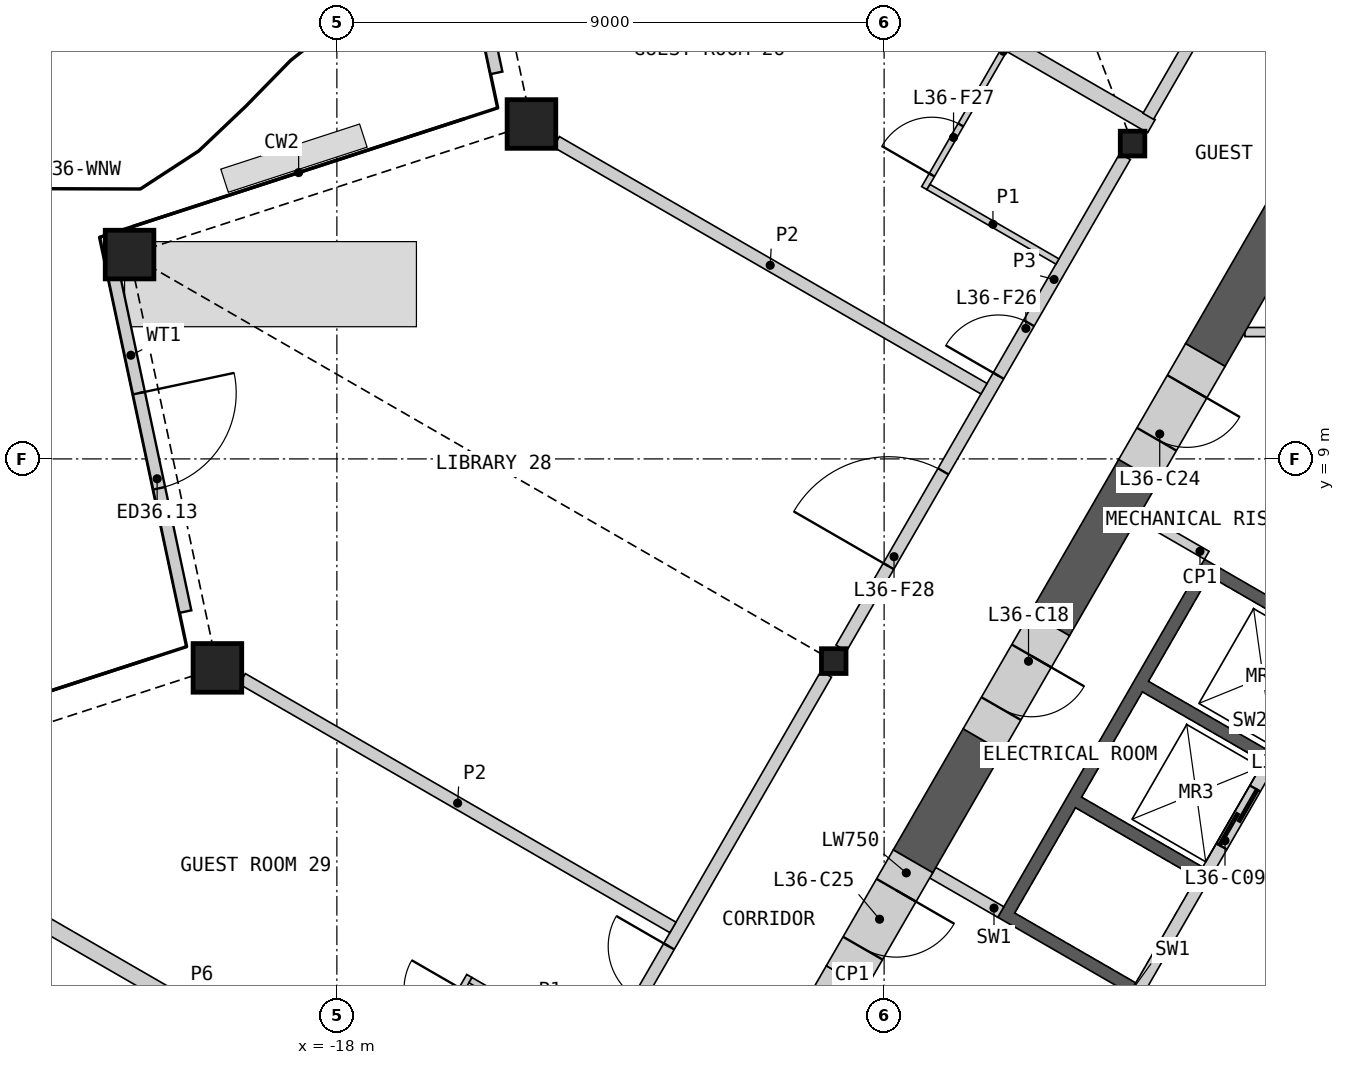
"""IFC4 building model, lengths in metres.
Left out: names, types, materials, properties, quantities, classifications, styles, units other than length and angle.
Written with IfcOpenShell. Run it as: python <this file> out.ifc"""

import sys

from ifc_helpers import new_model, si_unit, direction, frame, frame_2d, origin, origin_2d, place, context, subcontext, project, spatial, polyline, rectangle, hollow_rectangle, i_section, outline, extrude, element, fill, save


model = new_model("IFC4")
c1 = context("Model", 3, precision=1e-05, world=origin(), true_north=direction((0.0, 1.0)))
c2 = subcontext(c1, "Body", "Model", "MODEL_VIEW")
j1 = project(units=[si_unit("LENGTHUNIT", "METRE"), si_unit("PLANEANGLEUNIT", "RADIAN")], contexts=[c1])
p1 = place(None, origin())
s1 = spatial("IfcSite", under=j1, at=p1, CompositionType="ELEMENT")
p2 = place(p1, origin())
s2 = spatial("IfcBuilding", under=s1, at=p2, CompositionType="ELEMENT")
p3 = place(p2, frame((0.0, 0.0, 172.8)))
s3 = spatial("IfcBuildingStorey", under=s2, at=p3, CompositionType="ELEMENT", Elevation=172.8)
for number, where, z_axis, x_axis in (
    (1, (-14.8, 14.508, 0.0), (0.0, 0.0, 1.0), (1.0, 0.0, 0.0)),
    (2, (-21.409, 12.361, 0.0), (0.0, 0.0, 1.0), (1.0, 0.0, 0.0)),
    (3, (-19.965, 5.563, 0.0), (0.0, 0.0, 1.0), (1.0, 0.0, 0.0)),
):
    element("IfcColumn", number, at=place(p3, frame(where, z_axis=z_axis, x_axis=x_axis)), inside=s3, PredefinedType="COLUMN", context=c2, shape_type="SweptSolid", body=[
        extrude(hollow_rectangle(XDim=0.8, YDim=0.8, WallThickness=0.05, at=origin_2d()), origin(), (0.0, 0.0, 1.0), 3.6),
    ])
for number, where, z_axis, x_axis in (
    (4, (-4.914, 14.186, 0.0), (0.0, 0.0, 1.0), (1.0, 0.0, 0.0)),
    (5, (-9.828, 5.675, 0.0), (0.0, 0.0, 1.0), (1.0, 0.0, 0.0)),
):
    element("IfcColumn", number, at=place(p3, frame(where, z_axis=z_axis, x_axis=x_axis)), inside=s3, PredefinedType="COLUMN", context=c2, shape_type="SweptSolid", body=[
        extrude(i_section(OverallWidth=0.404, OverallDepth=0.407, WebThickness=0.027, FlangeThickness=0.044, at=origin_2d()), origin(), (0.0, 0.0, 1.0), 3.6),
    ])
p4 = place(p3, frame((-16.571, 20.971, 0.0), z_axis=(0.0, 0.0, 1.0), x_axis=(0.207872471739, -0.978155936184, 0.0)))
e6 = element("IfcWall", 6, at=p4, inside=s3, PredefinedType="SOLIDWALL", context=c2, shape_type="SweptSolid", body=[
    extrude(rectangle(XDim=5.748, YDim=0.2, at=frame_2d((2.874, 0.0))), origin(), (0.0, 0.0, 1.0), 2.701),
])
p5 = place(p4, frame((2.074, 0.0, 0.0)))
e7 = element("IfcOpeningElement", 7, at=p5, cuts=e6, PredefinedType="OPENING", context=c2, shape_type="SweptSolid", body=[
    extrude(rectangle(XDim=1.6, YDim=2.4, at=frame_2d((0.8, 1.2))), frame((0.0, 0.11, 0.0), z_axis=(0.0, -1.0, 0.0), x_axis=(1.0, 0.0, 0.0)), (0.0, 0.0, 1.0), 0.22),
])
p6 = place(p3, frame((-21.686, 12.111, 0.0), z_axis=(0.0, 0.0, 1.0), x_axis=(0.207872471739, -0.978155936184, 0.0)))
e8 = element("IfcWall", 8, at=p6, inside=s3, PredefinedType="SOLIDWALL", context=c2, shape_type="SweptSolid", body=[
    extrude(rectangle(XDim=5.748, YDim=0.2, at=frame_2d((2.874, 0.0))), origin(), (0.0, 0.0, 1.0), 2.701),
])
p7 = place(p6, frame((2.074, 0.0, 0.0)))
e9 = element("IfcOpeningElement", 9, at=p7, cuts=e8, PredefinedType="OPENING", context=c2, shape_type="SweptSolid", body=[
    extrude(rectangle(XDim=1.6, YDim=2.4, at=frame_2d((0.8, 1.2))), frame((0.0, 0.11, 0.0), z_axis=(0.0, -1.0, 0.0), x_axis=(1.0, 0.0, 0.0)), (0.0, 0.0, 1.0), 0.22),
])
p8 = place(p3, origin())
e10 = element("IfcWall", 10, at=p8, inside=s3, PredefinedType="SHEAR", context=c2, shape_type="SweptSolid", body=[
    extrude(outline(polyline([(-4.96, 0.208), (-7.131, 1.461), (-3.731, 7.35), (-1.561, 6.097), (-1.66, 5.924), (-3.652, 7.074), (-4.652, 5.342), (-2.66, 4.192), (-2.76, 4.019), (-4.752, 5.169), (-5.752, 3.437), (-3.76, 2.287), (-3.861, 2.113), (-5.852, 3.263), (-6.852, 1.531), (-4.861, 0.381), (-4.96, 0.208)])), origin(), (0.0, 0.0, 1.0), 3.25),
])
p9 = place(p3, frame((-1.631, 5.776, 0.0), z_axis=(0.0, 0.0, 1.0), x_axis=(-0.499992876559, -0.866029516466, 0.0)))
e11 = element("IfcWall", 11, at=p9, inside=s3, PredefinedType="SOLIDWALL", context=c2, shape_type="SweptSolid", body=[
    extrude(rectangle(XDim=6.486, YDim=0.2, at=frame_2d((3.243, 0.0))), origin(), (0.0, 0.0, 1.0), 3.25),
])
p10 = place(p9, frame((0.337, 0.0, 0.0)))
e12 = element("IfcOpeningElement", 12, at=p10, cuts=e11, PredefinedType="OPENING", context=c2, shape_type="SweptSolid", body=[
    extrude(rectangle(XDim=1.1, YDim=2.1, at=frame_2d((0.55, 1.05))), frame((0.0, 0.11, 0.0), z_axis=(0.0, -1.0, 0.0), x_axis=(1.0, 0.0, 0.0)), (0.0, 0.0, 1.0), 0.22),
])
p11 = place(p9, frame((2.537, 0.0, 0.0)))
e13 = element("IfcOpeningElement", 13, at=p11, cuts=e11, PredefinedType="OPENING", context=c2, shape_type="SweptSolid", body=[
    extrude(rectangle(XDim=1.1, YDim=2.1, at=frame_2d((0.55, 1.05))), frame((0.0, 0.11, 0.0), z_axis=(0.0, -1.0, 0.0), x_axis=(1.0, 0.0, 0.0)), (0.0, 0.0, 1.0), 0.22),
])
for number, where, z_axis, x_axis in (
    (14, (-7.081, 1.548, 0.0), (0.0, 0.0, 1.0), (-0.866, 0.5, 0.0)),
    (15, (-8.181, -0.357, 0.0), (0.0, 0.0, 1.0), (-0.866, 0.5, 0.0)),
):
    element("IfcWall", number, at=place(p3, frame(where, z_axis=z_axis, x_axis=x_axis)), inside=s3, PredefinedType="SHEAR", context=c2, shape_type="SweptSolid", body=[
        extrude(rectangle(XDim=1.293, YDim=0.2, at=frame_2d((0.646, 0.0))), origin(), (0.0, 0.0, 1.0), 3.25),
    ])
p12 = place(p3, frame((-3.693, 7.415, 0.0), z_axis=(0.0, 0.0, 1.0), x_axis=(-0.866003189247, 0.500038474733, 0.0)))
e16 = element("IfcWall", 16, at=p12, inside=s3, PredefinedType="PARTITIONING", context=c2, shape_type="SweptSolid", body=[
    extrude(rectangle(XDim=1.293, YDim=0.15, at=frame_2d((0.646, 0.0))), origin(), (0.0, 0.0, 1.0), 3.25),
])
p13 = place(p3, frame((-1.544, 11.087, 0.0), z_axis=(0.0, 0.0, 1.0), x_axis=(-1.0, 0.0, 0.0)))
e17 = element("IfcWall", 17, at=p13, inside=s3, PredefinedType="PARTITIONING", context=c2, shape_type="SweptSolid", body=[
    extrude(rectangle(XDim=1.522, YDim=0.15, at=frame_2d((0.761, 0.0))), origin(), (0.0, 0.0, 1.0), 3.25),
])
p14 = place(p3, frame((-0.325, 16.585, 0.0), z_axis=(0.0, 0.0, 1.0), x_axis=(-0.499993425452, -0.866029199568, 0.0)))
e18 = element("IfcWall", 18, at=p14, inside=s3, PredefinedType="SHEAR", context=c2, shape_type="SweptSolid", body=[
    extrude(rectangle(XDim=6.785, YDim=0.75, at=frame_2d((3.393, 0.0))), origin(), (0.0, 0.0, 1.0), 3.25),
])
p15 = place(p3, frame((-4.817, 8.804, 0.0), z_axis=(0.0, 0.0, 1.0), x_axis=(-0.500029273391, -0.866008502124, 0.0)))
e19 = element("IfcWall", 19, at=p15, inside=s3, PredefinedType="SHEAR", context=c2, shape_type="SweptSolid", body=[
    extrude(rectangle(XDim=2.916, YDim=0.75, at=frame_2d((1.458, 0.0))), origin(), (0.0, 0.0, 1.0), 3.25),
])
p16 = place(p3, frame((-7.375, 4.374, 0.0), z_axis=(0.0, 0.0, 1.0), x_axis=(-0.499952165731, -0.866053019151, 0.0)))
e20 = element("IfcWall", 20, at=p16, inside=s3, PredefinedType="SHEAR", context=c2, shape_type="SweptSolid", body=[
    extrude(rectangle(XDim=2.3, YDim=0.75, at=frame_2d((1.15, 0.0))), origin(), (0.0, 0.0, 1.0), 3.25),
])
p17 = place(p3, frame((-6.275, 6.279, 0.0), z_axis=(0.0, 0.0, 1.0), x_axis=(-0.499946605688, -0.86605622881, 0.0)))
e21 = element("IfcWall", 21, at=p17, inside=s3, PredefinedType="SHEAR", context=c2, shape_type="SweptSolid", body=[
    extrude(rectangle(XDim=2.2, YDim=0.75, at=frame_2d((1.1, 0.0))), origin(), (0.0, 0.0, 1.0), 3.25),
])
p18 = place(p17, frame((0.6, 0.0, 0.0)))
e22 = element("IfcOpeningElement", 22, at=p18, cuts=e21, PredefinedType="OPENING", context=c2, shape_type="SweptSolid", body=[
    extrude(rectangle(XDim=1.0, YDim=2.1, at=frame_2d((0.5, 1.05))), frame((0.0, 0.385, 0.0), z_axis=(0.0, -1.0, 0.0), x_axis=(1.0, 0.0, 0.0)), (0.0, 0.0, 1.0), 0.77),
])
p19 = place(p3, frame((-9.625, 0.477, 0.0), z_axis=(0.0, 0.0, 1.0), x_axis=(-0.499995718215, -0.86602787586, 0.0)))
e23 = element("IfcWall", 23, at=p19, inside=s3, PredefinedType="SHEAR", context=c2, shape_type="SweptSolid", body=[
    extrude(rectangle(XDim=3.016, YDim=0.75, at=frame_2d((1.508, 0.0))), origin(), (0.0, 0.0, 1.0), 3.25),
])
p20 = place(p19, frame((1.4, 0.0, 0.0)))
e24 = element("IfcOpeningElement", 24, at=p20, cuts=e23, PredefinedType="OPENING", context=c2, shape_type="SweptSolid", body=[
    extrude(rectangle(XDim=1.0, YDim=2.1, at=frame_2d((0.5, 1.05))), frame((0.0, 0.385, 0.0), z_axis=(0.0, -1.0, 0.0), x_axis=(1.0, 0.0, 0.0)), (0.0, 0.0, 1.0), 0.77),
])
p21 = place(p3, frame((-3.717, 10.709, 0.0), z_axis=(0.0, 0.0, 1.0), x_axis=(-0.50002983664, -0.866008176907, 0.0)))
e25 = element("IfcWall", 25, at=p21, inside=s3, PredefinedType="SHEAR", context=c2, shape_type="SweptSolid", body=[
    extrude(rectangle(XDim=2.2, YDim=0.75, at=frame_2d((1.1, 0.0))), origin(), (0.0, 0.0, 1.0), 3.25),
])
p22 = place(p21, frame((0.6, 0.0, 0.0)))
e26 = element("IfcOpeningElement", 26, at=p22, cuts=e25, PredefinedType="OPENING", context=c2, shape_type="SweptSolid", body=[
    extrude(rectangle(XDim=1.0, YDim=2.1, at=frame_2d((0.5, 1.05))), frame((0.0, 0.385, 0.0), z_axis=(0.0, -1.0, 0.0), x_axis=(1.0, 0.0, 0.0)), (0.0, 0.0, 1.0), 0.77),
])
p23 = place(p3, frame((-8.525, 2.382, 0.0), z_axis=(0.0, 0.0, 1.0), x_axis=(-0.500077893725, -0.86598042715, 0.0)))
e27 = element("IfcWall", 27, at=p23, inside=s3, PredefinedType="SHEAR", context=c2, shape_type="SweptSolid", body=[
    extrude(rectangle(XDim=2.2, YDim=0.75, at=frame_2d((1.1, 0.0))), origin(), (0.0, 0.0, 1.0), 3.25),
])
p24 = place(p23, frame((0.55, 0.0, 0.0)))
e28 = element("IfcOpeningElement", 28, at=p24, cuts=e27, PredefinedType="OPENING", context=c2, shape_type="SweptSolid", body=[
    extrude(rectangle(XDim=1.1, YDim=2.1, at=frame_2d((0.55, 1.05))), frame((0.0, 0.385, 0.0), z_axis=(0.0, -1.0, 0.0), x_axis=(1.0, 0.0, 0.0)), (0.0, 0.0, 1.0), 0.77),
])
p25 = place(p3, frame((-26.164, 3.292, 0.0), z_axis=(0.0, 0.0, 1.0), x_axis=(0.866022412254, -0.500005181446, 0.0)))
e29 = element("IfcWall", 29, at=p25, inside=s3, PredefinedType="PARTITIONING", context=c2, shape_type="SweptSolid", body=[
    extrude(rectangle(XDim=13.081, YDim=0.25, at=frame_2d((6.541, 0.0))), origin(), (0.0, 0.0, 1.0), 2.404),
])
p26 = place(p3, frame((-15.835, 20.956, 0.0), z_axis=(0.0, 0.0, 1.0), x_axis=(0.866029765546, -0.499992445131, 0.0)))
e30 = element("IfcWall", 30, at=p26, inside=s3, PredefinedType="PARTITIONING", context=c2, shape_type="SweptSolid", body=[
    extrude(rectangle(XDim=12.968, YDim=0.25, at=frame_2d((6.484, 0.0))), origin(), (0.0, 0.0, 1.0), 2.404),
])
p27 = place(p3, frame((-9.705, 5.888, 0.0), z_axis=(0.0, 0.0, 1.0), x_axis=(0.50000393355, 0.866023132736, 0.0)))
e31 = element("IfcWall", 31, at=p27, inside=s3, PredefinedType="PARTITIONING", context=c2, shape_type="SweptSolid", body=[
    extrude(rectangle(XDim=9.335, YDim=0.2, at=frame_2d((4.667, 0.0))), origin(), (0.0, 0.0, 1.0), 3.25),
])
p28 = place(p27, frame((5.172, 0.0, 0.0)))
e32 = element("IfcOpeningElement", 32, at=p28, cuts=e31, PredefinedType="OPENING", context=c2, shape_type="SweptSolid", body=[
    extrude(rectangle(XDim=1.0, YDim=2.1, at=frame_2d((0.5, 1.05))), frame((0.0, 0.11, 0.0), z_axis=(0.0, -1.0, 0.0), x_axis=(1.0, 0.0, 0.0)), (0.0, 0.0, 1.0), 0.22),
])
p29 = place(p27, frame((1.556, 0.0, 0.0)))
e33 = element("IfcOpeningElement", 33, at=p29, cuts=e31, PredefinedType="OPENING", context=c2, shape_type="SweptSolid", body=[
    extrude(rectangle(XDim=1.8, YDim=2.1, at=frame_2d((0.9, 1.05))), frame((0.0, 0.11, 0.0), z_axis=(0.0, -1.0, 0.0), x_axis=(1.0, 0.0, 0.0)), (0.0, 0.0, 1.0), 0.22),
])
p30 = place(p3, frame((-14.619, -2.624, 0.0), z_axis=(0.0, 0.0, 1.0), x_axis=(0.50000393355, 0.866023132736, 0.0)))
e34 = element("IfcWall", 34, at=p30, inside=s3, PredefinedType="PARTITIONING", context=c2, shape_type="SweptSolid", body=[
    extrude(rectangle(XDim=9.335, YDim=0.2, at=frame_2d((4.667, 0.0))), origin(), (0.0, 0.0, 1.0), 3.25),
])
p31 = place(p30, frame((3.163, 0.0, 0.0)))
e35 = element("IfcOpeningElement", 35, at=p31, cuts=e34, PredefinedType="OPENING", context=c2, shape_type="SweptSolid", body=[
    extrude(rectangle(XDim=1.0, YDim=2.1, at=frame_2d((0.5, 1.05))), frame((0.0, 0.11, 0.0), z_axis=(0.0, -1.0, 0.0), x_axis=(1.0, 0.0, 0.0)), (0.0, 0.0, 1.0), 0.22),
])
p32 = place(p3, frame((-4.655, 14.635, 0.0), z_axis=(0.0, 0.0, 1.0), x_axis=(0.499988331988, 0.866032140209, 0.0)))
e36 = element("IfcWall", 36, at=p32, inside=s3, PredefinedType="PARTITIONING", context=c2, shape_type="SweptSolid", body=[
    extrude(rectangle(XDim=5.485, YDim=0.2, at=frame_2d((2.742, 0.0))), origin(), (0.0, 0.0, 1.0), 3.25),
])
p33 = place(p32, frame((4.032, 0.0, 0.0)))
e37 = element("IfcOpeningElement", 37, at=p33, cuts=e36, PredefinedType="OPENING", context=c2, shape_type="SweptSolid", body=[
    extrude(rectangle(XDim=1.1, YDim=2.1, at=frame_2d((0.55, 1.05))), frame((0.0, 0.11, 0.0), z_axis=(0.0, -1.0, 0.0), x_axis=(1.0, 0.0, 0.0)), (0.0, 0.0, 1.0), 0.22),
])
p34 = place(p3, frame((-19.555, 5.383, 0.0), z_axis=(0.0, 0.0, 1.0), x_axis=(0.866027979776, -0.499995538225, 0.0)))
e38 = element("IfcWall", 38, at=p34, inside=s3, PredefinedType="PARTITIONING", context=c2, shape_type="SweptSolid", body=[
    extrude(rectangle(XDim=8.177, YDim=0.2, at=frame_2d((4.089, 0.0))), origin(), (0.0, 0.0, 1.0), 2.404),
])
p35 = place(p3, frame((-14.39, 14.215, 0.0), z_axis=(0.0, 0.0, 1.0), x_axis=(0.86602738064, -0.499996575971, 0.0)))
e39 = element("IfcWall", 39, at=p35, inside=s3, PredefinedType="PARTITIONING", context=c2, shape_type="SweptSolid", body=[
    extrude(rectangle(XDim=8.121, YDim=0.2, at=frame_2d((4.06, 0.0))), origin(), (0.0, 0.0, 1.0), 2.404),
])
p36 = place(p3, frame((-18.421, -4.008, 0.0), z_axis=(0.0, 0.0, 1.0), x_axis=(0.500006934395, 0.866021400173, 0.0)))
e40 = element("IfcWall", 40, at=p36, inside=s3, PredefinedType="PARTITIONING", context=c2, shape_type="SweptSolid", body=[
    extrude(rectangle(XDim=5.2, YDim=0.1, at=frame_2d((2.6, 0.0))), origin(), (0.0, 0.0, 1.0), 2.404),
])
p37 = place(p36, frame((4.0, 0.0, 0.0)))
e41 = element("IfcOpeningElement", 41, at=p37, cuts=e40, PredefinedType="OPENING", context=c2, shape_type="SweptSolid", body=[
    extrude(rectangle(XDim=0.95, YDim=2.1, at=frame_2d((0.475, 1.05))), frame((0.0, 0.06, 0.0), z_axis=(0.0, -1.0, 0.0), x_axis=(1.0, 0.0, 0.0)), (0.0, 0.0, 1.0), 0.12),
])
p38 = place(p36, frame((0.25, 0.0, 0.0)))
e42 = element("IfcOpeningElement", 42, at=p38, cuts=e40, PredefinedType="OPENING", context=c2, shape_type="SweptSolid", body=[
    extrude(rectangle(XDim=0.95, YDim=2.1, at=frame_2d((0.475, 1.05))), frame((0.0, 0.06, 0.0), z_axis=(0.0, -1.0, 0.0), x_axis=(1.0, 0.0, 0.0)), (0.0, 0.0, 1.0), 0.12),
])
p39 = place(p3, frame((-8.339, 13.454, 0.0), z_axis=(0.0, 0.0, 1.0), x_axis=(0.499992051641, 0.866029992723, 0.0)))
e43 = element("IfcWall", 43, at=p39, inside=s3, PredefinedType="PARTITIONING", context=c2, shape_type="SweptSolid", body=[
    extrude(rectangle(XDim=5.2, YDim=0.1, at=frame_2d((2.6, 0.0))), origin(), (0.0, 0.0, 1.0), 2.404),
])
p40 = place(p39, frame((4.0, 0.0, 0.0)))
e44 = element("IfcOpeningElement", 44, at=p40, cuts=e43, PredefinedType="OPENING", context=c2, shape_type="SweptSolid", body=[
    extrude(rectangle(XDim=0.95, YDim=2.1, at=frame_2d((0.475, 1.05))), frame((0.0, 0.06, 0.0), z_axis=(0.0, -1.0, 0.0), x_axis=(1.0, 0.0, 0.0)), (0.0, 0.0, 1.0), 0.12),
])
p41 = place(p39, frame((0.25, 0.0, 0.0)))
e45 = element("IfcOpeningElement", 45, at=p41, cuts=e43, PredefinedType="OPENING", context=c2, shape_type="SweptSolid", body=[
    extrude(rectangle(XDim=0.95, YDim=2.1, at=frame_2d((0.475, 1.05))), frame((0.0, 0.06, 0.0), z_axis=(0.0, -1.0, 0.0), x_axis=(1.0, 0.0, 0.0)), (0.0, 0.0, 1.0), 0.12),
])
p42 = place(p3, frame((-15.802, 0.427, 0.0), z_axis=(0.0, 0.0, 1.0), x_axis=(0.866032905446, -0.499987006516, 0.0)))
e46 = element("IfcWall", 46, at=p42, inside=s3, PredefinedType="PARTITIONING", context=c2, shape_type="SweptSolid", body=[
    extrude(rectangle(XDim=2.45, YDim=0.1, at=frame_2d((1.225, 0.0))), origin(), (0.0, 0.0, 1.0), 2.404),
])
p43 = place(p3, frame((-8.271, 13.472, 0.0), z_axis=(0.0, 0.0, 1.0), x_axis=(0.865989751695, -0.500061746146, 0.0)))
e47 = element("IfcWall", 47, at=p43, inside=s3, PredefinedType="PARTITIONING", context=c2, shape_type="SweptSolid", body=[
    extrude(rectangle(XDim=2.45, YDim=0.1, at=frame_2d((1.225, 0.0))), origin(), (0.0, 0.0, 1.0), 2.404),
])
p44 = place(p7, origin())
e48 = element("IfcDoor", 48, at=p44, inside=s3, OperationType="DOUBLE_DOOR_SINGLE_SWING", PredefinedType="DOOR", context=c2, shape_type="SweptSolid", body=[
    extrude(rectangle(XDim=1.6, YDim=2.4, at=frame_2d((0.8, 1.2))), frame((0.0, 0.025, 0.0), z_axis=(0.0, -1.0, 0.0), x_axis=(1.0, 0.0, 0.0)), (0.0, 0.0, 1.0), 0.05),
])
fill(e9, e48)
p45 = place(p11, origin())
e49 = element("IfcDoor", 49, at=p45, inside=s3, OperationType="SLIDING_TO_LEFT", PredefinedType="DOOR", context=c2, shape_type="SweptSolid", body=[
    extrude(rectangle(XDim=1.1, YDim=2.1, at=frame_2d((0.55, 1.05))), frame((0.0, 0.025, 0.0), z_axis=(0.0, -1.0, 0.0), x_axis=(1.0, 0.0, 0.0)), (0.0, 0.0, 1.0), 0.05),
])
fill(e13, e49)
p46 = place(p18, origin())
e50 = element("IfcDoor", 50, at=p46, inside=s3, OperationType="SINGLE_SWING_LEFT", PredefinedType="DOOR", context=c2, shape_type="SweptSolid", body=[
    extrude(rectangle(XDim=1.0, YDim=2.1, at=frame_2d((0.5, 1.05))), frame((0.0, 0.13, 0.0), z_axis=(0.0, -1.0, 0.0), x_axis=(1.0, 0.0, 0.0)), (0.0, 0.0, 1.0), 0.05),
])
fill(e22, e50)
p47 = place(p22, origin())
e51 = element("IfcDoor", 51, at=p47, inside=s3, OperationType="SINGLE_SWING_LEFT", PredefinedType="DOOR", context=c2, shape_type="SweptSolid", body=[
    extrude(rectangle(XDim=1.0, YDim=2.1, at=frame_2d((0.5, 1.05))), frame((0.0, 0.13, 0.0), z_axis=(0.0, -1.0, 0.0), x_axis=(1.0, 0.0, 0.0)), (0.0, 0.0, 1.0), 0.05),
])
fill(e26, e51)
p48 = place(p24, origin())
e52 = element("IfcDoor", 52, at=p48, inside=s3, OperationType="SINGLE_SWING_LEFT", PredefinedType="DOOR", context=c2, shape_type="SweptSolid", body=[
    extrude(rectangle(XDim=1.1, YDim=2.1, at=frame_2d((0.55, 1.05))), frame((0.0, 0.13, 0.0), z_axis=(0.0, -1.0, 0.0), x_axis=(1.0, 0.0, 0.0)), (0.0, 0.0, 1.0), 0.05),
])
fill(e28, e52)
p49 = place(p28, origin())
e53 = element("IfcDoor", 53, at=p49, inside=s3, OperationType="SINGLE_SWING_LEFT", PredefinedType="DOOR", context=c2, shape_type="SweptSolid", body=[
    extrude(rectangle(XDim=1.0, YDim=2.1, at=frame_2d((0.5, 1.05))), frame((0.0, 0.025, 0.0), z_axis=(0.0, -1.0, 0.0), x_axis=(1.0, 0.0, 0.0)), (0.0, 0.0, 1.0), 0.05),
])
fill(e32, e53)
p50 = place(p41, origin())
e54 = element("IfcDoor", 54, at=p50, inside=s3, OperationType="SINGLE_SWING_LEFT", PredefinedType="DOOR", context=c2, shape_type="SweptSolid", body=[
    extrude(rectangle(XDim=0.95, YDim=2.1, at=frame_2d((0.475, 1.05))), frame((0.0, 0.025, 0.0), z_axis=(0.0, -1.0, 0.0), x_axis=(1.0, 0.0, 0.0)), (0.0, 0.0, 1.0), 0.05),
])
fill(e45, e54)
p51 = place(p29, origin())
e55 = element("IfcDoor", 55, at=p51, inside=s3, OperationType="DOUBLE_DOOR_SINGLE_SWING", PredefinedType="DOOR", context=c2, shape_type="SweptSolid", body=[
    extrude(rectangle(XDim=1.8, YDim=2.1, at=frame_2d((0.9, 1.05))), frame((0.0, 0.025, 0.0), z_axis=(0.0, -1.0, 0.0), x_axis=(1.0, 0.0, 0.0)), (0.0, 0.0, 1.0), 0.05),
])
fill(e33, e55)
p52 = place(p31, origin())
e56 = element("IfcDoor", 56, at=p52, inside=s3, OperationType="SINGLE_SWING_RIGHT", PredefinedType="DOOR", context=c2, shape_type="SweptSolid", body=[
    extrude(rectangle(XDim=1.0, YDim=2.1, at=frame_2d((0.5, 1.05))), frame((0.0, 0.025, 0.0), z_axis=(0.0, -1.0, 0.0), x_axis=(1.0, 0.0, 0.0)), (0.0, 0.0, 1.0), 0.05),
])
fill(e35, e56)
save(model, sys.argv[1])
